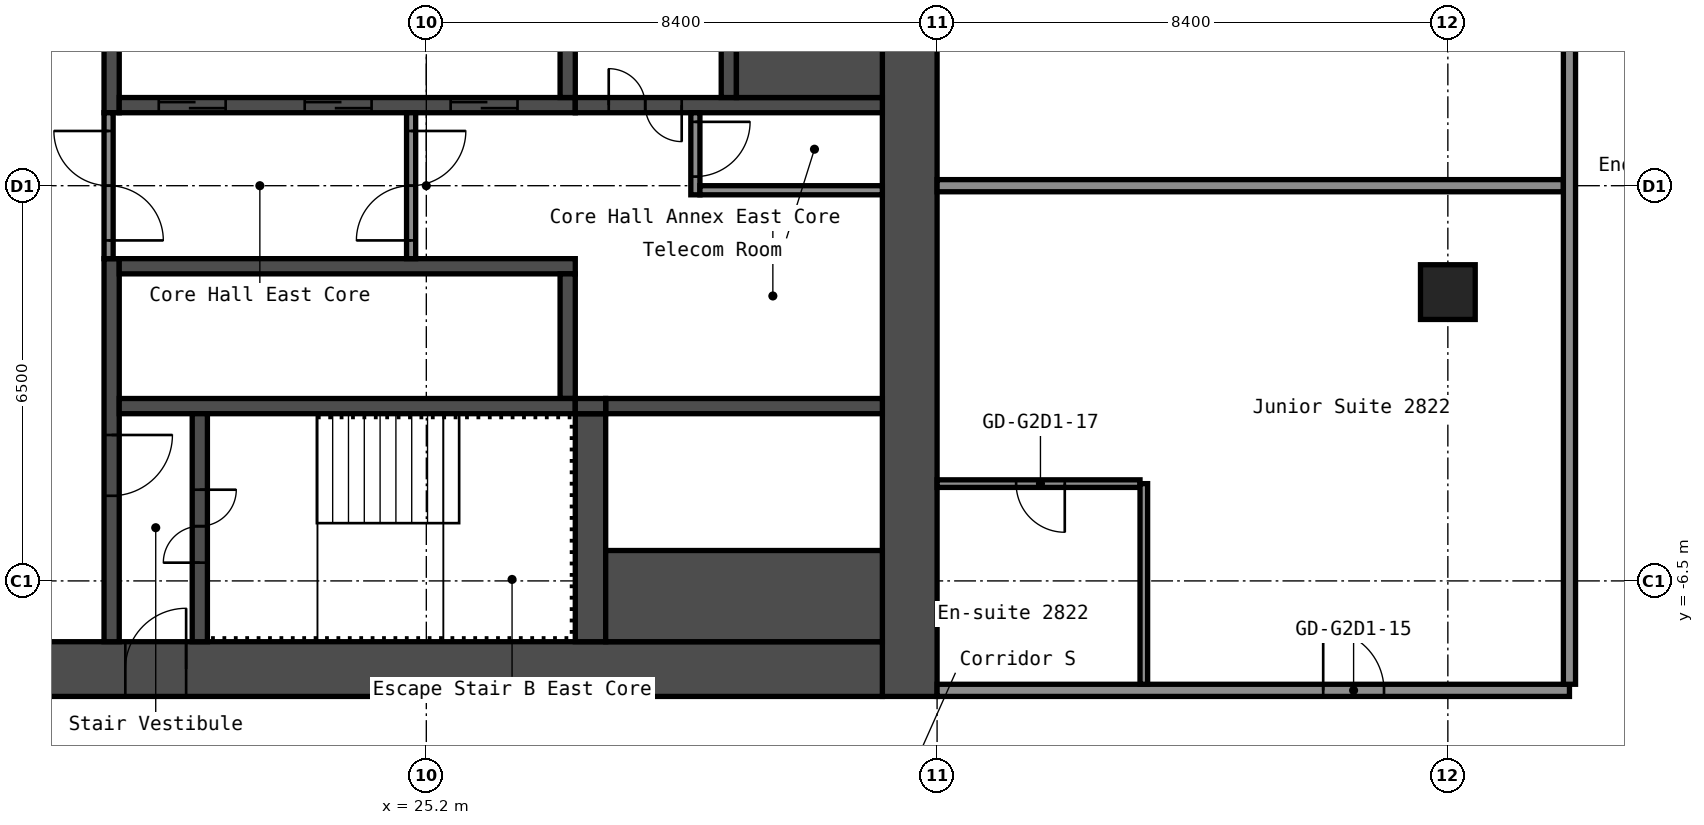
"""IFC4 building model, lengths in metres.
Left out: names, types, materials, properties, quantities, classifications, styles, units other than length and angle.
Written with IfcOpenShell. Run it as: python <this file> out.ifc"""

import sys

from ifc_helpers import new_model, si_unit, direction, frame, frame_2d, origin, origin_2d, place, context, subcontext, project, spatial, rectangle, hollow_rectangle, extrude, element, fill, save


model = new_model("IFC4")
c1 = context("Model", 3, precision=1e-05, world=origin(), true_north=direction((0.0, 1.0)))
c2 = subcontext(c1, "Body", "Model", "MODEL_VIEW")
j1 = project(units=[si_unit("LENGTHUNIT", "METRE"), si_unit("PLANEANGLEUNIT", "RADIAN")], contexts=[c1])
p1 = place(None, origin())
s1 = spatial("IfcSite", under=j1, at=p1, CompositionType="ELEMENT")
p2 = place(p1, origin())
s2 = spatial("IfcBuilding", under=s1, at=p2, CompositionType="ELEMENT")
p3 = place(p2, frame((0.0, 0.0, 101.0)))
s3 = spatial("IfcBuildingStorey", under=s2, at=p3, CompositionType="ELEMENT", Elevation=101.0)
p4 = place(p3, frame((42.0, -1.75, 0.0), z_axis=(0.0, 0.0, 1.0), x_axis=(1.0, 0.0, 0.0)))
e1 = element("IfcColumn", 1, at=p4, inside=s3, PredefinedType="COLUMN", context=c2, shape_type="SweptSolid", body=[
    extrude(hollow_rectangle(XDim=0.9, YDim=0.9, WallThickness=0.036, at=origin_2d()), origin(), (0.0, 0.0, 1.0), 2.8),
])
p5 = place(p3, frame((33.15, -8.4, 0.0), z_axis=(0.0, 0.0, 1.0), x_axis=(0.0, 1.0, 0.0)))
e2 = element("IfcWall", 2, at=p5, inside=s3, PredefinedType="SHEAR", context=c2, shape_type="SweptSolid", body=[
    extrude(rectangle(XDim=16.8, YDim=0.9, at=frame_2d((8.4, 0.0))), origin(), (0.0, 0.0, 1.0), 2.8),
])
p6 = place(p3, frame((17.7, -7.95, 0.0), z_axis=(0.0, 0.0, 1.0), x_axis=(1.0, 0.0, 0.0)))
e3 = element("IfcWall", 3, at=p6, inside=s3, PredefinedType="SHEAR", context=c2, shape_type="SweptSolid", body=[
    extrude(rectangle(XDim=15.0, YDim=0.9, at=frame_2d((7.5, 0.0))), origin(), (0.0, 0.0, 1.0), 2.8),
])
p7 = place(p6, frame((2.55, 0.0, 0.0)))
e4 = element("IfcOpeningElement", 4, at=p7, cuts=e3, PredefinedType="OPENING", context=c2, shape_type="SweptSolid", body=[
    extrude(rectangle(XDim=1.0, YDim=2.1, at=frame_2d((0.5, 1.05))), frame((0.0, 0.46, 0.0), z_axis=(0.0, -1.0, 0.0), x_axis=(1.0, 0.0, 0.0)), (0.0, 0.0, 1.0), 0.92),
])
p8 = place(p3, frame((20.025, 1.2, 0.0), z_axis=(0.0, 0.0, 1.0), x_axis=(0.0, 1.0, 0.0)))
e5 = element("IfcWall", 5, at=p8, inside=s3, PredefinedType="SHEAR", context=c2, shape_type="SweptSolid", body=[
    extrude(rectangle(XDim=6.3, YDim=0.25, at=frame_2d((3.15, 0.0))), origin(), (0.0, 0.0, 1.0), 2.8),
])
p9 = place(p3, frame((20.025, -7.5, 0.0), z_axis=(0.0, 0.0, 1.0), x_axis=(0.0, 1.0, 0.0)))
e6 = element("IfcWall", 6, at=p9, inside=s3, PredefinedType="SHEAR", context=c2, shape_type="SweptSolid", body=[
    extrude(rectangle(XDim=6.3, YDim=0.25, at=frame_2d((3.15, 0.0))), origin(), (0.0, 0.0, 1.0), 2.8),
])
p10 = place(p9, frame((2.4, 0.0, 0.0)))
e7 = element("IfcOpeningElement", 7, at=p10, cuts=e6, PredefinedType="OPENING", context=c2, shape_type="SweptSolid", body=[
    extrude(rectangle(XDim=1.0, YDim=2.1, at=frame_2d((0.5, 1.05))), frame((0.0, 0.135, 0.0), z_axis=(0.0, -1.0, 0.0), x_axis=(1.0, 0.0, 0.0)), (0.0, 0.0, 1.0), 0.27),
])
p11 = place(p3, frame((20.15, 1.325, 0.0), z_axis=(0.0, 0.0, 1.0), x_axis=(1.0, 0.0, 0.0)))
e8 = element("IfcWall", 8, at=p11, inside=s3, PredefinedType="SHEAR", context=c2, shape_type="SweptSolid", body=[
    extrude(rectangle(XDim=7.5, YDim=0.25, at=frame_2d((3.75, 0.0))), origin(), (0.0, 0.0, 1.0), 2.8),
])
p12 = place(p11, frame((0.65, 0.0, 0.0)))
e9 = element("IfcOpeningElement", 9, at=p12, cuts=e8, PredefinedType="OPENING", context=c2, shape_type="SweptSolid", body=[
    extrude(rectangle(XDim=1.1, YDim=2.1, at=frame_2d((0.55, 1.05))), frame((0.0, 0.135, 0.0), z_axis=(0.0, -1.0, 0.0), x_axis=(1.0, 0.0, 0.0)), (0.0, 0.0, 1.0), 0.27),
])
p13 = place(p11, frame((3.05, 0.0, 0.0)))
e10 = element("IfcOpeningElement", 10, at=p13, cuts=e8, PredefinedType="OPENING", context=c2, shape_type="SweptSolid", body=[
    extrude(rectangle(XDim=1.1, YDim=2.1, at=frame_2d((0.55, 1.05))), frame((0.0, 0.135, 0.0), z_axis=(0.0, -1.0, 0.0), x_axis=(1.0, 0.0, 0.0)), (0.0, 0.0, 1.0), 0.27),
])
p14 = place(p11, frame((5.45, 0.0, 0.0)))
e11 = element("IfcOpeningElement", 11, at=p14, cuts=e8, PredefinedType="OPENING", context=c2, shape_type="SweptSolid", body=[
    extrude(rectangle(XDim=1.1, YDim=2.1, at=frame_2d((0.55, 1.05))), frame((0.0, 0.135, 0.0), z_axis=(0.0, -1.0, 0.0), x_axis=(1.0, 0.0, 0.0)), (0.0, 0.0, 1.0), 0.27),
])
p15 = place(p3, frame((27.525, 1.45, 0.0), z_axis=(0.0, 0.0, 1.0), x_axis=(0.0, 1.0, 0.0)))
e12 = element("IfcWall", 12, at=p15, inside=s3, PredefinedType="SHEAR", context=c2, shape_type="SweptSolid", body=[
    extrude(rectangle(XDim=2.05, YDim=0.25, at=frame_2d((1.025, 0.0))), origin(), (0.0, 0.0, 1.0), 2.8),
])
p16 = place(p3, frame((27.65, 1.325, 0.0), z_axis=(0.0, 0.0, 1.0), x_axis=(1.0, 0.0, 0.0)))
e13 = element("IfcWall", 13, at=p16, inside=s3, PredefinedType="SHEAR", context=c2, shape_type="SweptSolid", body=[
    extrude(rectangle(XDim=5.05, YDim=0.25, at=frame_2d((2.525, 0.0))), origin(), (0.0, 0.0, 1.0), 2.8),
])
p17 = place(p16, frame((0.55, 0.0, 0.0)))
e14 = element("IfcOpeningElement", 14, at=p17, cuts=e13, PredefinedType="OPENING", context=c2, shape_type="SweptSolid", body=[
    extrude(rectangle(XDim=1.2, YDim=2.1, at=frame_2d((0.6, 1.05))), frame((0.0, 0.135, 0.0), z_axis=(0.0, -1.0, 0.0), x_axis=(1.0, 0.0, 0.0)), (0.0, 0.0, 1.0), 0.27),
])
p18 = place(p3, frame((30.175, 1.45, 0.0), z_axis=(0.0, 0.0, 1.0), x_axis=(0.0, 1.0, 0.0)))
e15 = element("IfcWall", 15, at=p18, inside=s3, PredefinedType="SHEAR", context=c2, shape_type="SweptSolid", body=[
    extrude(rectangle(XDim=6.05, YDim=0.25, at=frame_2d((3.025, 0.0))), origin(), (0.0, 0.0, 1.0), 2.8),
])
p19 = place(p18, frame((2.625, 0.0, 0.0)))
e16 = element("IfcOpeningElement", 16, at=p19, cuts=e15, PredefinedType="OPENING", context=c2, shape_type="SweptSolid", body=[
    extrude(rectangle(XDim=1.1, YDim=2.1, at=frame_2d((0.55, 1.05))), frame((0.0, 0.135, 0.0), z_axis=(0.0, -1.0, 0.0), x_axis=(1.0, 0.0, 0.0)), (0.0, 0.0, 1.0), 0.27),
])
p20 = place(p3, frame((30.3, 2.375, 0.0), z_axis=(0.0, 0.0, 1.0), x_axis=(1.0, 0.0, 0.0)))
e17 = element("IfcWall", 17, at=p20, inside=s3, PredefinedType="SHEAR", context=c2, shape_type="SweptSolid", body=[
    extrude(rectangle(XDim=2.4, YDim=1.85, at=frame_2d((1.2, 0.0))), origin(), (0.0, 0.0, 1.0), 2.8),
])
p21 = place(p3, frame((20.15, -1.325, 0.0), z_axis=(0.0, 0.0, 1.0), x_axis=(1.0, 0.0, 0.0)))
e18 = element("IfcWall", 18, at=p21, inside=s3, PredefinedType="SHEAR", context=c2, shape_type="SweptSolid", body=[
    extrude(rectangle(XDim=7.5, YDim=0.25, at=frame_2d((3.75, 0.0))), origin(), (0.0, 0.0, 1.0), 2.8),
])
p22 = place(p3, frame((27.525, -3.5, 0.0), z_axis=(0.0, 0.0, 1.0), x_axis=(0.0, 1.0, 0.0)))
e19 = element("IfcWall", 19, at=p22, inside=s3, PredefinedType="SHEAR", context=c2, shape_type="SweptSolid", body=[
    extrude(rectangle(XDim=2.05, YDim=0.25, at=frame_2d((1.025, 0.0))), origin(), (0.0, 0.0, 1.0), 2.8),
])
p23 = place(p3, frame((20.15, -3.625, 0.0), z_axis=(0.0, 0.0, 1.0), x_axis=(1.0, 0.0, 0.0)))
e20 = element("IfcWall", 20, at=p23, inside=s3, PredefinedType="SHEAR", context=c2, shape_type="SweptSolid", body=[
    extrude(rectangle(XDim=7.5, YDim=0.25, at=frame_2d((3.75, 0.0))), origin(), (0.0, 0.0, 1.0), 2.8),
])
p24 = place(p3, frame((21.475, -7.5, 0.0), z_axis=(0.0, 0.0, 1.0), x_axis=(0.0, 1.0, 0.0)))
e21 = element("IfcWall", 21, at=p24, inside=s3, PredefinedType="SHEAR", context=c2, shape_type="SweptSolid", body=[
    extrude(rectangle(XDim=3.75, YDim=0.25, at=frame_2d((1.875, 0.0))), origin(), (0.0, 0.0, 1.0), 2.8),
])
p25 = place(p24, frame((1.3, 0.0, 0.0)))
e22 = element("IfcOpeningElement", 22, at=p25, cuts=e21, PredefinedType="OPENING", context=c2, shape_type="SweptSolid", body=[
    extrude(rectangle(XDim=1.2, YDim=2.1, at=frame_2d((0.6, 1.05))), frame((0.0, 0.135, 0.0), z_axis=(0.0, -1.0, 0.0), x_axis=(1.0, 0.0, 0.0)), (0.0, 0.0, 1.0), 0.27),
])
p26 = place(p3, frame((27.9, -7.5, 0.0), z_axis=(0.0, 0.0, 1.0), x_axis=(0.0, 1.0, 0.0)))
e23 = element("IfcWall", 23, at=p26, inside=s3, PredefinedType="SHEAR", context=c2, shape_type="SweptSolid", body=[
    extrude(rectangle(XDim=3.75, YDim=0.5, at=frame_2d((1.875, 0.0))), origin(), (0.0, 0.0, 1.0), 2.8),
])
p27 = place(p3, frame((28.15, -3.625, 0.0), z_axis=(0.0, 0.0, 1.0), x_axis=(1.0, 0.0, 0.0)))
e24 = element("IfcWall", 24, at=p27, inside=s3, PredefinedType="SHEAR", context=c2, shape_type="SweptSolid", body=[
    extrude(rectangle(XDim=4.55, YDim=0.25, at=frame_2d((2.275, 0.0))), origin(), (0.0, 0.0, 1.0), 2.8),
])
p28 = place(p3, frame((28.15, -6.75, 0.0), z_axis=(0.0, 0.0, 1.0), x_axis=(1.0, 0.0, 0.0)))
e25 = element("IfcWall", 25, at=p28, inside=s3, PredefinedType="SHEAR", context=c2, shape_type="SweptSolid", body=[
    extrude(rectangle(XDim=4.55, YDim=1.5, at=frame_2d((2.275, 0.0))), origin(), (0.0, 0.0, 1.0), 2.8),
])
p29 = place(p3, frame((27.65, -3.625, 0.0), z_axis=(0.0, 0.0, 1.0), x_axis=(1.0, 0.0, 0.0)))
e26 = element("IfcWall", 26, at=p29, inside=s3, PredefinedType="SHEAR", context=c2, shape_type="SweptSolid", body=[
    extrude(rectangle(XDim=0.5, YDim=0.25, at=frame_2d((0.25, 0.0))), origin(), (0.0, 0.0, 1.0), 2.8),
])
p30 = place(p3, frame((19.975, -1.2, 0.0), z_axis=(0.0, 0.0, 1.0), x_axis=(0.0, 1.0, 0.0)))
e27 = element("IfcWall", 27, at=p30, inside=s3, PredefinedType="PARTITIONING", context=c2, shape_type="SweptSolid", body=[
    extrude(rectangle(XDim=2.4, YDim=0.15, at=frame_2d((1.2, 0.0))), origin(), (0.0, 0.0, 1.0), 2.8),
])
p31 = place(p30, frame((0.3, 0.0, 0.0)))
e28 = element("IfcOpeningElement", 28, at=p31, cuts=e27, PredefinedType="OPENING", context=c2, shape_type="SweptSolid", body=[
    extrude(rectangle(XDim=1.8, YDim=2.1, at=frame_2d((0.9, 1.05))), frame((0.0, 0.085, 0.0), z_axis=(0.0, -1.0, 0.0), x_axis=(1.0, 0.0, 0.0)), (0.0, 0.0, 1.0), 0.17),
])
p32 = place(p3, frame((24.95, -1.2, 0.0), z_axis=(0.0, 0.0, 1.0), x_axis=(0.0, 1.0, 0.0)))
e29 = element("IfcWall", 29, at=p32, inside=s3, PredefinedType="PARTITIONING", context=c2, shape_type="SweptSolid", body=[
    extrude(rectangle(XDim=2.4, YDim=0.15, at=frame_2d((1.2, 0.0))), origin(), (0.0, 0.0, 1.0), 2.8),
])
p33 = place(p32, frame((0.3, 0.0, 0.0)))
e30 = element("IfcOpeningElement", 30, at=p33, cuts=e29, PredefinedType="OPENING", context=c2, shape_type="SweptSolid", body=[
    extrude(rectangle(XDim=1.8, YDim=2.1, at=frame_2d((0.9, 1.05))), frame((0.0, 0.085, 0.0), z_axis=(0.0, -1.0, 0.0), x_axis=(1.0, 0.0, 0.0)), (0.0, 0.0, 1.0), 0.17),
])
p34 = place(p3, frame((29.625, -0.15, 0.0), z_axis=(0.0, 0.0, 1.0), x_axis=(0.0, 1.0, 0.0)))
e31 = element("IfcWall", 31, at=p34, inside=s3, PredefinedType="PARTITIONING", context=c2, shape_type="SweptSolid", body=[
    extrude(rectangle(XDim=1.35, YDim=0.15, at=frame_2d((0.675, 0.0))), origin(), (0.0, 0.0, 1.0), 2.8),
])
p35 = place(p34, frame((0.3, 0.0, 0.0)))
e32 = element("IfcOpeningElement", 32, at=p35, cuts=e31, PredefinedType="OPENING", context=c2, shape_type="SweptSolid", body=[
    extrude(rectangle(XDim=0.9, YDim=2.1, at=frame_2d((0.45, 1.05))), frame((0.0, 0.085, 0.0), z_axis=(0.0, -1.0, 0.0), x_axis=(1.0, 0.0, 0.0)), (0.0, 0.0, 1.0), 0.17),
])
p36 = place(p3, frame((29.7, -0.075, 0.0), z_axis=(0.0, 0.0, 1.0), x_axis=(1.0, 0.0, 0.0)))
e33 = element("IfcWall", 33, at=p36, inside=s3, PredefinedType="PARTITIONING", context=c2, shape_type="SweptSolid", body=[
    extrude(rectangle(XDim=3.0, YDim=0.15, at=frame_2d((1.5, 0.0))), origin(), (0.0, 0.0, 1.0), 2.8),
])
p37 = place(p3, frame((33.6, -8.3, 0.0), z_axis=(0.0, 0.0, 1.0), x_axis=(1.0, 0.0, 0.0)))
e34 = element("IfcWall", 34, at=p37, inside=s3, PredefinedType="PARTITIONING", context=c2, shape_type="SweptSolid", body=[
    extrude(rectangle(XDim=10.4, YDim=0.2, at=frame_2d((5.2, 0.0))), origin(), (0.0, 0.0, 1.0), 2.8),
])
p38 = place(p37, frame((6.35, 0.0, 0.0)))
e35 = element("IfcOpeningElement", 35, at=p38, cuts=e34, PredefinedType="OPENING", context=c2, shape_type="SweptSolid", body=[
    extrude(rectangle(XDim=1.0, YDim=2.1, at=frame_2d((0.5, 1.05))), frame((0.0, 0.11, 0.0), z_axis=(0.0, -1.0, 0.0), x_axis=(1.0, 0.0, 0.0)), (0.0, 0.0, 1.0), 0.22),
])
p39 = place(p3, frame((33.6, -4.9, 0.0), z_axis=(0.0, 0.0, 1.0), x_axis=(1.0, 0.0, 0.0)))
e36 = element("IfcWall", 36, at=p39, inside=s3, PredefinedType="PARTITIONING", context=c2, shape_type="SweptSolid", body=[
    extrude(rectangle(XDim=3.337, YDim=0.125, at=frame_2d((1.669, 0.0))), origin(), (0.0, 0.0, 1.0), 2.8),
])
p40 = place(p39, frame((1.3, 0.0, 0.0)))
e37 = element("IfcOpeningElement", 37, at=p40, cuts=e36, PredefinedType="OPENING", context=c2, shape_type="SweptSolid", body=[
    extrude(rectangle(XDim=0.8, YDim=2.1, at=frame_2d((0.4, 1.05))), frame((0.0, 0.073, 0.0), z_axis=(0.0, -1.0, 0.0), x_axis=(1.0, 0.0, 0.0)), (0.0, 0.0, 1.0), 0.145),
])
p41 = place(p3, frame((33.6, 0.0, 0.0), z_axis=(0.0, 0.0, 1.0), x_axis=(1.0, 0.0, 0.0)))
e38 = element("IfcWall", 38, at=p41, inside=s3, PredefinedType="PARTITIONING", context=c2, shape_type="SweptSolid", body=[
    extrude(rectangle(XDim=10.3, YDim=0.2, at=frame_2d((5.15, 0.0))), origin(), (0.0, 0.0, 1.0), 2.8),
])
p42 = place(p3, frame((37.0, -8.2, 0.0), z_axis=(0.0, 0.0, 1.0), x_axis=(0.0, 1.0, 0.0)))
e39 = element("IfcWall", 39, at=p42, inside=s3, PredefinedType="PARTITIONING", context=c2, shape_type="SweptSolid", body=[
    extrude(rectangle(XDim=3.3, YDim=0.125, at=frame_2d((1.65, 0.0))), origin(), (0.0, 0.0, 1.0), 2.8),
])
p43 = place(p3, frame((44.0, -8.2, 0.0), z_axis=(0.0, 0.0, 1.0), x_axis=(0.0, 1.0, 0.0)))
e40 = element("IfcWall", 40, at=p43, inside=s3, PredefinedType="PARTITIONING", context=c2, shape_type="SweptSolid", body=[
    extrude(rectangle(XDim=16.4, YDim=0.2, at=frame_2d((8.2, 0.0))), origin(), (0.0, 0.0, 1.0), 2.8),
])
p44 = place(p7, origin())
e41 = element("IfcDoor", 41, at=p44, inside=s3, OperationType="SINGLE_SWING_LEFT", PredefinedType="DOOR", context=c2, shape_type="SweptSolid", body=[
    extrude(rectangle(XDim=1.0, YDim=2.1, at=frame_2d((0.5, 1.05))), frame((0.0, 0.025, 0.0), z_axis=(0.0, -1.0, 0.0), x_axis=(1.0, 0.0, 0.0)), (0.0, 0.0, 1.0), 0.05),
])
fill(e4, e41)
p45 = place(p25, origin())
e42 = element("IfcDoor", 42, at=p45, inside=s3, OperationType="DOUBLE_DOOR_SINGLE_SWING", PredefinedType="DOOR", context=c2, shape_type="SweptSolid", body=[
    extrude(rectangle(XDim=1.2, YDim=2.1, at=frame_2d((0.6, 1.05))), frame((0.0, 0.025, 0.0), z_axis=(0.0, -1.0, 0.0), x_axis=(1.0, 0.0, 0.0)), (0.0, 0.0, 1.0), 0.05),
])
fill(e22, e42)
p46 = place(p10, origin())
e43 = element("IfcDoor", 43, at=p46, inside=s3, OperationType="SINGLE_SWING_RIGHT", PredefinedType="DOOR", context=c2, shape_type="SweptSolid", body=[
    extrude(rectangle(XDim=1.0, YDim=2.1, at=frame_2d((0.5, 1.05))), frame((0.0, 0.025, 0.0), z_axis=(0.0, -1.0, 0.0), x_axis=(1.0, 0.0, 0.0)), (0.0, 0.0, 1.0), 0.05),
])
fill(e7, e43)
p47 = place(p17, origin())
e44 = element("IfcDoor", 44, at=p47, inside=s3, OperationType="DOUBLE_DOOR_SINGLE_SWING", PredefinedType="DOOR", context=c2, shape_type="SweptSolid", body=[
    extrude(rectangle(XDim=1.2, YDim=2.1, at=frame_2d((0.6, 1.05))), frame((0.0, 0.025, 0.0), z_axis=(0.0, -1.0, 0.0), x_axis=(1.0, 0.0, 0.0)), (0.0, 0.0, 1.0), 0.05),
])
fill(e14, e44)
p48 = place(p31, origin())
e45 = element("IfcDoor", 45, at=p48, inside=s3, OperationType="DOUBLE_DOOR_SINGLE_SWING", PredefinedType="DOOR", context=c2, shape_type="SweptSolid", body=[
    extrude(rectangle(XDim=1.8, YDim=2.1, at=frame_2d((0.9, 1.05))), frame((0.0, 0.025, 0.0), z_axis=(0.0, -1.0, 0.0), x_axis=(1.0, 0.0, 0.0)), (0.0, 0.0, 1.0), 0.05),
])
fill(e28, e45)
p49 = place(p33, origin())
e46 = element("IfcDoor", 46, at=p49, inside=s3, OperationType="DOUBLE_DOOR_SINGLE_SWING", PredefinedType="DOOR", context=c2, shape_type="SweptSolid", body=[
    extrude(rectangle(XDim=1.8, YDim=2.1, at=frame_2d((0.9, 1.05))), frame((0.0, 0.025, 0.0), z_axis=(0.0, -1.0, 0.0), x_axis=(1.0, 0.0, 0.0)), (0.0, 0.0, 1.0), 0.05),
])
fill(e30, e46)
p50 = place(p35, origin())
e47 = element("IfcDoor", 47, at=p50, inside=s3, OperationType="SINGLE_SWING_RIGHT", PredefinedType="DOOR", context=c2, shape_type="SweptSolid", body=[
    extrude(rectangle(XDim=0.9, YDim=2.1, at=frame_2d((0.45, 1.05))), frame((0.0, 0.025, 0.0), z_axis=(0.0, -1.0, 0.0), x_axis=(1.0, 0.0, 0.0)), (0.0, 0.0, 1.0), 0.05),
])
fill(e32, e47)
p51 = place(p12, origin())
e48 = element("IfcDoor", 48, at=p51, inside=s3, OperationType="DOUBLE_DOOR_SLIDING", PredefinedType="DOOR", context=c2, shape_type="SweptSolid", body=[
    extrude(rectangle(XDim=1.1, YDim=2.1, at=frame_2d((0.55, 1.05))), frame((0.0, 0.025, 0.0), z_axis=(0.0, -1.0, 0.0), x_axis=(1.0, 0.0, 0.0)), (0.0, 0.0, 1.0), 0.05),
])
fill(e9, e48)
p52 = place(p13, origin())
e49 = element("IfcDoor", 49, at=p52, inside=s3, OperationType="DOUBLE_DOOR_SLIDING", PredefinedType="DOOR", context=c2, shape_type="SweptSolid", body=[
    extrude(rectangle(XDim=1.1, YDim=2.1, at=frame_2d((0.55, 1.05))), frame((0.0, 0.025, 0.0), z_axis=(0.0, -1.0, 0.0), x_axis=(1.0, 0.0, 0.0)), (0.0, 0.0, 1.0), 0.05),
])
fill(e10, e49)
p53 = place(p14, origin())
e50 = element("IfcDoor", 50, at=p53, inside=s3, OperationType="DOUBLE_DOOR_SLIDING", PredefinedType="DOOR", context=c2, shape_type="SweptSolid", body=[
    extrude(rectangle(XDim=1.1, YDim=2.1, at=frame_2d((0.55, 1.05))), frame((0.0, 0.025, 0.0), z_axis=(0.0, -1.0, 0.0), x_axis=(1.0, 0.0, 0.0)), (0.0, 0.0, 1.0), 0.05),
])
fill(e11, e50)
p54 = place(p38, origin())
e51 = element("IfcDoor", 51, at=p54, inside=s3, OperationType="SINGLE_SWING_RIGHT", PredefinedType="DOOR", context=c2, shape_type="SweptSolid", body=[
    extrude(rectangle(XDim=1.0, YDim=2.1, at=frame_2d((0.5, 1.05))), frame((0.0, 0.025, 0.0), z_axis=(0.0, -1.0, 0.0), x_axis=(1.0, 0.0, 0.0)), (0.0, 0.0, 1.0), 0.05),
])
fill(e35, e51)
p55 = place(p40, origin())
e52 = element("IfcDoor", 52, at=p55, inside=s3, OperationType="SINGLE_SWING_RIGHT", PredefinedType="DOOR", context=c2, shape_type="SweptSolid", body=[
    extrude(rectangle(XDim=0.8, YDim=2.1, at=frame_2d((0.4, 1.05))), frame((0.0, 0.025, 0.0), z_axis=(0.0, -1.0, 0.0), x_axis=(1.0, 0.0, 0.0)), (0.0, 0.0, 1.0), 0.05),
])
fill(e37, e52)
save(model, sys.argv[1])
